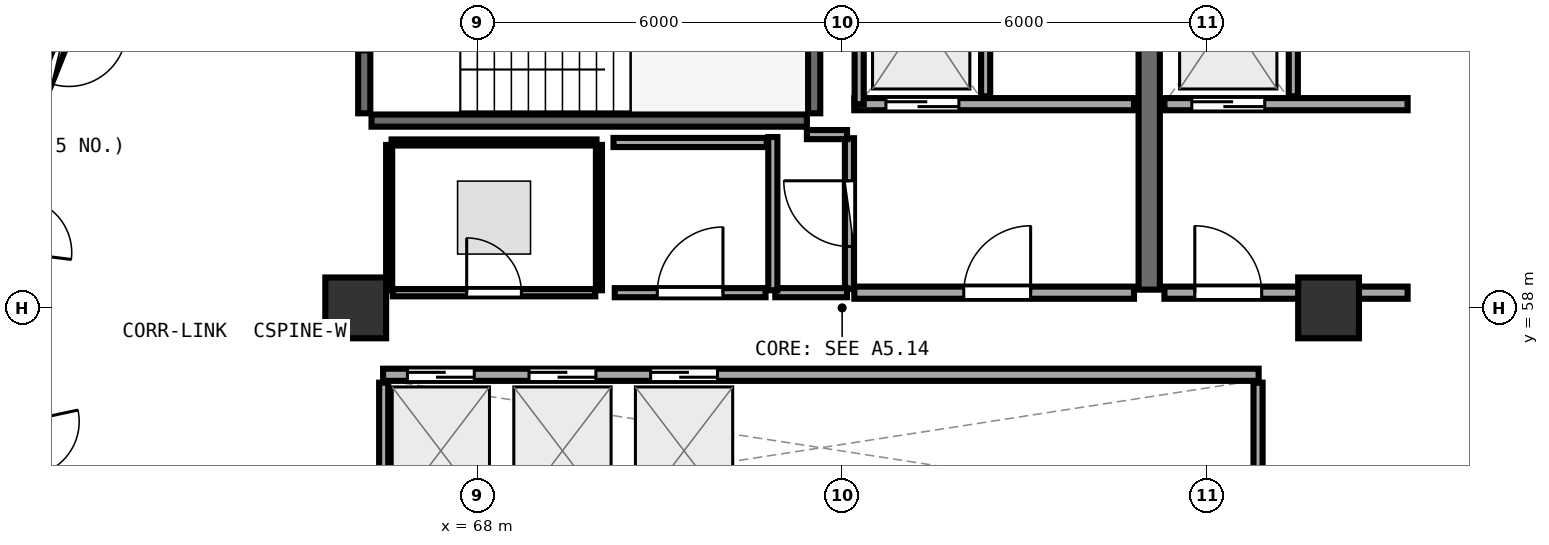
"""IFC4 building model, lengths in metres.
Left out: names, types, materials, properties, quantities, classifications, styles, units other than length and angle.
Written with IfcOpenShell. Run it as: python <this file> out.ifc"""

import sys

from ifc_helpers import new_model, si_unit, direction, frame, frame_2d, origin, origin_2d, place, context, subcontext, project, spatial, rectangle, extrude, element, fill, save


model = new_model("IFC4")
c1 = context("Model", 3, precision=1e-05, world=origin(), true_north=direction((0.0, 1.0)))
c2 = subcontext(c1, "Body", "Model", "MODEL_VIEW")
j1 = project(units=[si_unit("LENGTHUNIT", "METRE"), si_unit("PLANEANGLEUNIT", "RADIAN")], contexts=[c1])
p1 = place(None, origin())
s1 = spatial("IfcSite", under=j1, at=p1, CompositionType="ELEMENT")
p2 = place(p1, origin())
s2 = spatial("IfcBuilding", under=s1, at=p2, CompositionType="ELEMENT")
p3 = place(p2, frame((0.0, 0.0, 226.95)))
s3 = spatial("IfcBuildingStorey", under=s2, at=p3, CompositionType="ELEMENT", Elevation=226.95)
for number, where, z_axis, x_axis in (
    (1, (82.0, 58.0, 0.0), (0.0, 0.0, 1.0), (1.0, 0.0, 0.0)),
    (2, (66.0, 58.0, 0.0), (0.0, 0.0, 1.0), (1.0, 0.0, 0.0)),
):
    element("IfcColumn", number, at=place(p3, frame(where, z_axis=z_axis, x_axis=x_axis)), inside=s3, PredefinedType="PILASTER", context=c2, shape_type="SweptSolid", body=[
        extrude(rectangle(XDim=1.0, YDim=1.0, at=origin_2d()), origin(), (0.0, 0.0, 1.0), 3.75),
    ])
p4 = place(p3, frame((66.26, 61.08, 0.0), z_axis=(0.0, 0.0, 1.0), x_axis=(1.0, 0.0, 0.0)))
e3 = element("IfcWall", 3, at=p4, inside=s3, PredefinedType="SHEAR", context=c2, shape_type="SweptSolid", body=[
    extrude(rectangle(XDim=7.16, YDim=0.2, at=frame_2d((3.58, 0.0))), origin(), (0.0, 0.0, 1.0), 3.49),
])
p5 = place(p3, frame((73.54, 61.2, 0.0), z_axis=(0.0, 0.0, 1.0), x_axis=(0.0, 1.0, 0.0)))
e4 = element("IfcWall", 4, at=p5, inside=s3, PredefinedType="SHEAR", context=c2, shape_type="SweptSolid", body=[
    extrude(rectangle(XDim=3.07, YDim=0.2, at=frame_2d((1.535, 0.0))), origin(), (0.0, 0.0, 1.0), 3.49),
])
p6 = place(p3, frame((66.14, 64.27, 0.0), z_axis=(0.0, 0.0, 1.0), x_axis=(0.0, -1.0, 0.0)))
e5 = element("IfcWall", 5, at=p6, inside=s3, PredefinedType="SHEAR", context=c2, shape_type="SweptSolid", body=[
    extrude(rectangle(XDim=3.07, YDim=0.2, at=frame_2d((1.535, 0.0))), origin(), (0.0, 0.0, 1.0), 3.49),
])
p7 = place(p6, frame((1.01, 0.0, 0.0)))
e6 = element("IfcOpeningElement", 6, at=p7, cuts=e5, PredefinedType="OPENING", context=c2, shape_type="SweptSolid", body=[
    extrude(rectangle(XDim=1.05, YDim=2.1, at=frame_2d((0.525, 1.05))), frame((0.0, 0.11, 0.0), z_axis=(0.0, -1.0, 0.0), x_axis=(1.0, 0.0, 0.0)), (0.0, 0.0, 1.0), 0.22),
])
p8 = place(p3, frame((79.05, 58.3, 0.0), z_axis=(0.0, 0.0, 1.0), x_axis=(0.0, 1.0, 0.0)))
e7 = element("IfcWall", 7, at=p8, inside=s3, PredefinedType="SHEAR", context=c2, shape_type="SweptSolid", body=[
    extrude(rectangle(XDim=6.3, YDim=0.35, at=frame_2d((3.15, 0.0))), origin(), (0.0, 0.0, 1.0), 3.49),
])
p9 = place(p3, frame((74.2, 61.35, 0.0), z_axis=(0.0, 0.0, 1.0), x_axis=(1.0, 0.0, 0.0)))
e8 = element("IfcWall", 8, at=p9, inside=s3, PredefinedType="SOLIDWALL", context=c2, shape_type="SweptSolid", body=[
    extrude(rectangle(XDim=4.6, YDim=0.2, at=frame_2d((2.3, 0.0))), origin(), (0.0, 0.0, 1.0), 3.48),
])
p10 = place(p9, frame((0.52, 0.0, 0.0)))
e9 = element("IfcOpeningElement", 9, at=p10, cuts=e8, PredefinedType="OPENING", context=c2, shape_type="SweptSolid", body=[
    extrude(rectangle(XDim=1.2, YDim=2.15, at=frame_2d((0.6, 1.075))), frame((0.0, 0.11, 0.0), z_axis=(0.0, -1.0, 0.0), x_axis=(1.0, 0.0, 0.0)), (0.0, 0.0, 1.0), 0.22),
])
p11 = place(p3, frame((74.28, 61.35, 0.0), z_axis=(0.0, 0.0, 1.0), x_axis=(0.0, 1.0, 0.0)))
e10 = element("IfcWall", 10, at=p11, inside=s3, PredefinedType="PARTITIONING", context=c2, shape_type="SweptSolid", body=[
    extrude(rectangle(XDim=2.97, YDim=0.15, at=frame_2d((1.485, 0.0))), origin(), (0.0, 0.0, 1.0), 3.48),
])
p12 = place(p3, frame((76.36, 61.48, 0.0), z_axis=(0.0, 0.0, 1.0), x_axis=(0.0, 1.0, 0.0)))
e11 = element("IfcWall", 11, at=p12, inside=s3, PredefinedType="PARTITIONING", context=c2, shape_type="SweptSolid", body=[
    extrude(rectangle(XDim=2.84, YDim=0.15, at=frame_2d((1.42, 0.0))), origin(), (0.0, 0.0, 1.0), 3.48),
])
p13 = place(p3, frame((79.3, 61.35, 0.0), z_axis=(0.0, 0.0, 1.0), x_axis=(1.0, 0.0, 0.0)))
e12 = element("IfcWall", 12, at=p13, inside=s3, PredefinedType="SOLIDWALL", context=c2, shape_type="SweptSolid", body=[
    extrude(rectangle(XDim=4.0, YDim=0.2, at=frame_2d((2.0, 0.0))), origin(), (0.0, 0.0, 1.0), 2.775),
])
p14 = place(p13, frame((0.45, 0.0, 0.0)))
e13 = element("IfcOpeningElement", 13, at=p14, cuts=e12, PredefinedType="OPENING", context=c2, shape_type="SweptSolid", body=[
    extrude(rectangle(XDim=1.2, YDim=2.15, at=frame_2d((0.6, 1.075))), frame((0.0, 0.11, 0.0), z_axis=(0.0, -1.0, 0.0), x_axis=(1.0, 0.0, 0.0)), (0.0, 0.0, 1.0), 0.22),
])
p15 = place(p3, frame((81.42, 61.48, 0.0), z_axis=(0.0, 0.0, 1.0), x_axis=(0.0, 1.0, 0.0)))
e14 = element("IfcWall", 14, at=p15, inside=s3, PredefinedType="PARTITIONING", context=c2, shape_type="SweptSolid", body=[
    extrude(rectangle(XDim=2.84, YDim=0.15, at=frame_2d((1.42, 0.0))), origin(), (0.0, 0.0, 1.0), 3.48),
])
p16 = place(p3, frame((74.2, 58.25, 0.0), z_axis=(0.0, 0.0, 1.0), x_axis=(1.0, 0.0, 0.0)))
e15 = element("IfcWall", 15, at=p16, inside=s3, PredefinedType="SOLIDWALL", context=c2, shape_type="SweptSolid", body=[
    extrude(rectangle(XDim=4.6, YDim=0.2, at=frame_2d((2.3, 0.0))), origin(), (0.0, 0.0, 1.0), 3.48),
])
p17 = place(p16, frame((1.8, 0.0, 0.0)))
e16 = element("IfcOpeningElement", 16, at=p17, cuts=e15, PredefinedType="OPENING", context=c2, shape_type="SweptSolid", body=[
    extrude(rectangle(XDim=1.1, YDim=2.1, at=frame_2d((0.55, 1.05))), frame((0.0, 0.11, 0.0), z_axis=(0.0, -1.0, 0.0), x_axis=(1.0, 0.0, 0.0)), (0.0, 0.0, 1.0), 0.22),
])
p18 = place(p3, frame((79.3, 58.25, 0.0), z_axis=(0.0, 0.0, 1.0), x_axis=(1.0, 0.0, 0.0)))
e17 = element("IfcWall", 17, at=p18, inside=s3, PredefinedType="SOLIDWALL", context=c2, shape_type="SweptSolid", body=[
    extrude(rectangle(XDim=4.0, YDim=0.2, at=frame_2d((2.0, 0.0))), origin(), (0.0, 0.0, 1.0), 2.775),
])
p19 = place(p18, frame((0.5, 0.0, 0.0)))
e18 = element("IfcOpeningElement", 18, at=p19, cuts=e17, PredefinedType="OPENING", context=c2, shape_type="SweptSolid", body=[
    extrude(rectangle(XDim=1.1, YDim=2.1, at=frame_2d((0.55, 1.05))), frame((0.0, 0.11, 0.0), z_axis=(0.0, -1.0, 0.0), x_axis=(1.0, 0.0, 0.0)), (0.0, 0.0, 1.0), 0.22),
])
p20 = place(p3, frame((66.45, 56.9, 0.0), z_axis=(0.0, 0.0, 1.0), x_axis=(1.0, 0.0, 0.0)))
e19 = element("IfcWall", 19, at=p20, inside=s3, PredefinedType="SOLIDWALL", context=c2, shape_type="SweptSolid", body=[
    extrude(rectangle(XDim=14.4, YDim=0.2, at=frame_2d((7.2, 0.0))), origin(), (0.0, 0.0, 1.0), 3.48),
])
p21 = place(p20, frame((0.4, 0.0, 0.0)))
e20 = element("IfcOpeningElement", 20, at=p21, cuts=e19, PredefinedType="OPENING", context=c2, shape_type="SweptSolid", body=[
    extrude(rectangle(XDim=1.1, YDim=2.1, at=frame_2d((0.55, 1.05))), frame((0.0, 0.11, 0.0), z_axis=(0.0, -1.0, 0.0), x_axis=(1.0, 0.0, 0.0)), (0.0, 0.0, 1.0), 0.22),
])
p22 = place(p20, frame((2.4, 0.0, 0.0)))
e21 = element("IfcOpeningElement", 21, at=p22, cuts=e19, PredefinedType="OPENING", context=c2, shape_type="SweptSolid", body=[
    extrude(rectangle(XDim=1.1, YDim=2.1, at=frame_2d((0.55, 1.05))), frame((0.0, 0.11, 0.0), z_axis=(0.0, -1.0, 0.0), x_axis=(1.0, 0.0, 0.0)), (0.0, 0.0, 1.0), 0.22),
])
p23 = place(p20, frame((4.4, 0.0, 0.0)))
e22 = element("IfcOpeningElement", 22, at=p23, cuts=e19, PredefinedType="OPENING", context=c2, shape_type="SweptSolid", body=[
    extrude(rectangle(XDim=1.1, YDim=2.1, at=frame_2d((0.55, 1.05))), frame((0.0, 0.11, 0.0), z_axis=(0.0, -1.0, 0.0), x_axis=(1.0, 0.0, 0.0)), (0.0, 0.0, 1.0), 0.22),
])
for number, where, z_axis, x_axis in (
    (23, (66.46, 54.48, 0.0), (0.0, 0.0, 1.0), (0.0, 1.0, 0.0)),
    (24, (80.84, 54.48, 0.0), (0.0, 0.0, 1.0), (0.0, 1.0, 0.0)),
):
    element("IfcWall", number, at=place(p3, frame(where, z_axis=z_axis, x_axis=x_axis)), inside=s3, PredefinedType="PARTITIONING", context=c2, shape_type="SweptSolid", body=[
        extrude(rectangle(XDim=2.29, YDim=0.15, at=frame_2d((1.145, 0.0))), origin(), (0.0, 0.0, 1.0), 3.48),
    ])
p24 = place(p3, frame((74.12, 58.31, 0.0), z_axis=(0.0, 0.0, 1.0), x_axis=(0.0, 1.0, 0.0)))
e25 = element("IfcWall", 25, at=p24, inside=s3, PredefinedType="PARTITIONING", context=c2, shape_type="SweptSolid", body=[
    extrude(rectangle(XDim=2.48, YDim=0.15, at=frame_2d((1.24, 0.0))), origin(), (0.0, 0.0, 1.0), 3.48),
])
p25 = place(p24, frame((0.7, 0.0, 0.0)))
e26 = element("IfcOpeningElement", 26, at=p25, cuts=e25, PredefinedType="OPENING", context=c2, shape_type="SweptSolid", body=[
    extrude(rectangle(XDim=1.08, YDim=2.1, at=frame_2d((0.54, 1.05))), frame((0.0, 0.085, 0.0), z_axis=(0.0, -1.0, 0.0), x_axis=(1.0, 0.0, 0.0)), (0.0, 0.0, 1.0), 0.17),
])
p26 = place(p3, frame((66.61, 58.25, 0.0), z_axis=(0.0, 0.0, 1.0), x_axis=(1.0, 0.0, 0.0)))
e27 = element("IfcWall", 27, at=p26, inside=s3, PredefinedType="PARTITIONING", context=c2, shape_type="SweptSolid", body=[
    extrude(rectangle(XDim=3.33, YDim=0.12, at=frame_2d((1.665, 0.0))), origin(), (0.0, 0.0, 1.0), 3.48),
])
p27 = place(p26, frame((1.215, 0.0, 0.0)))
e28 = element("IfcOpeningElement", 28, at=p27, cuts=e27, PredefinedType="OPENING", context=c2, shape_type="SweptSolid", body=[
    extrude(rectangle(XDim=0.9, YDim=2.08, at=frame_2d((0.45, 1.04))), frame((0.0, 0.07, 0.0), z_axis=(0.0, -1.0, 0.0), x_axis=(1.0, 0.0, 0.0)), (0.0, 0.0, 1.0), 0.14),
])
p28 = place(p3, frame((70.26, 58.25, 0.0), z_axis=(0.0, 0.0, 1.0), x_axis=(1.0, 0.0, 0.0)))
e29 = element("IfcWall", 29, at=p28, inside=s3, PredefinedType="PARTITIONING", context=c2, shape_type="SweptSolid", body=[
    extrude(rectangle(XDim=2.48, YDim=0.15, at=frame_2d((1.24, 0.0))), origin(), (0.0, 0.0, 1.0), 3.48),
])
p29 = place(p28, frame((0.7, 0.0, 0.0)))
e30 = element("IfcOpeningElement", 30, at=p29, cuts=e29, PredefinedType="OPENING", context=c2, shape_type="SweptSolid", body=[
    extrude(rectangle(XDim=1.08, YDim=2.1, at=frame_2d((0.54, 1.05))), frame((0.0, 0.085, 0.0), z_axis=(0.0, -1.0, 0.0), x_axis=(1.0, 0.0, 0.0)), (0.0, 0.0, 1.0), 0.17),
])
p30 = place(p3, frame((61.409, 62.907, 0.0), z_axis=(0.0, 0.0, 1.0), x_axis=(-0.370667853418, -0.928765493783, 0.0)))
e31 = element("IfcWall", 31, at=p30, inside=s3, PredefinedType="PARTITIONING", context=c2, shape_type="SweptSolid", body=[
    extrude(rectangle(XDim=1.631, YDim=0.15, at=frame_2d((0.815, 0.0))), origin(), (0.0, 0.0, 1.0), 3.235),
])
p31 = place(p30, frame((0.34, 0.0, 0.0)))
e32 = element("IfcOpeningElement", 32, at=p31, cuts=e31, PredefinedType="OPENING", context=c2, shape_type="SweptSolid", body=[
    extrude(rectangle(XDim=0.95, YDim=2.08, at=frame_2d((0.475, 1.04))), frame((0.0, 0.085, 0.0), z_axis=(0.0, -1.0, 0.0), x_axis=(1.0, 0.0, 0.0)), (0.0, 0.0, 1.0), 0.17),
])
p32 = place(p3, frame((60.301, 57.303, 0.0), z_axis=(0.0, 0.0, 1.0), x_axis=(0.209791966594, -0.977746046145, 0.0)))
e33 = element("IfcWall", 33, at=p32, inside=s3, PredefinedType="PARTITIONING", context=c2, shape_type="SweptSolid", body=[
    extrude(rectangle(XDim=3.298, YDim=0.12, at=frame_2d((1.649, 0.0))), origin(), (0.0, 0.0, 1.0), 3.48),
])
p33 = place(p32, frame((1.199, 0.0, 0.0)))
e34 = element("IfcOpeningElement", 34, at=p33, cuts=e33, PredefinedType="OPENING", context=c2, shape_type="SweptSolid", body=[
    extrude(rectangle(XDim=0.9, YDim=2.08, at=frame_2d((0.45, 1.04))), frame((0.0, 0.07, 0.0), z_axis=(0.0, -1.0, 0.0), x_axis=(1.0, 0.0, 0.0)), (0.0, 0.0, 1.0), 0.14),
])
p34 = place(p3, frame((72.9, 58.25, 0.0), z_axis=(0.0, 0.0, 1.0), x_axis=(1.0, 0.0, 0.0)))
e35 = element("IfcWall", 35, at=p34, inside=s3, PredefinedType="PARTITIONING", context=c2, shape_type="SweptSolid", body=[
    extrude(rectangle(XDim=1.18, YDim=0.15, at=frame_2d((0.59, 0.0))), origin(), (0.0, 0.0, 1.0), 3.48),
])
p35 = place(p3, frame((74.08, 60.85, 0.0), z_axis=(0.0, 0.0, 1.0), x_axis=(-1.0, 0.0, 0.0)))
e36 = element("IfcWall", 36, at=p35, inside=s3, PredefinedType="PARTITIONING", context=c2, shape_type="SweptSolid", body=[
    extrude(rectangle(XDim=0.66, YDim=0.15, at=frame_2d((0.33, 0.0))), origin(), (0.0, 0.0, 1.0), 3.48),
])
p36 = place(p3, frame((72.86, 60.81, 0.0), z_axis=(0.0, 0.0, 1.0), x_axis=(0.0, -1.0, 0.0)))
e37 = element("IfcWall", 37, at=p36, inside=s3, PredefinedType="PARTITIONING", context=c2, shape_type="SweptSolid", body=[
    extrude(rectangle(XDim=2.52, YDim=0.15, at=frame_2d((1.26, 0.0))), origin(), (0.0, 0.0, 1.0), 3.48),
])
p37 = place(p3, frame((70.0, 58.29, 0.0), z_axis=(0.0, 0.0, 1.0), x_axis=(0.0, 1.0, 0.0)))
e38 = element("IfcWall", 38, at=p37, inside=s3, PredefinedType="PARTITIONING", context=c2, shape_type="SweptSolid", body=[
    extrude(rectangle(XDim=2.39, YDim=0.1, at=frame_2d((1.195, 0.0))), origin(), (0.0, 0.0, 1.0), 3.48),
])
p38 = place(p3, frame((69.96, 60.72, 0.0), z_axis=(0.0, 0.0, 1.0), x_axis=(-1.0, 0.0, 0.0)))
e39 = element("IfcWall", 39, at=p38, inside=s3, PredefinedType="PARTITIONING", context=c2, shape_type="SweptSolid", body=[
    extrude(rectangle(XDim=3.37, YDim=0.1, at=frame_2d((1.685, 0.0))), origin(), (0.0, 0.0, 1.0), 3.48),
])
p39 = place(p3, frame((66.55, 60.68, 0.0), z_axis=(0.0, 0.0, 1.0), x_axis=(0.0, -1.0, 0.0)))
e40 = element("IfcWall", 40, at=p39, inside=s3, PredefinedType="PARTITIONING", context=c2, shape_type="SweptSolid", body=[
    extrude(rectangle(XDim=2.39, YDim=0.1, at=frame_2d((1.195, 0.0))), origin(), (0.0, 0.0, 1.0), 3.48),
])
p40 = place(p3, frame((72.76, 60.72, 0.0), z_axis=(0.0, 0.0, 1.0), x_axis=(-1.0, 0.0, 0.0)))
e41 = element("IfcWall", 41, at=p40, inside=s3, PredefinedType="PARTITIONING", context=c2, shape_type="SweptSolid", body=[
    extrude(rectangle(XDim=2.52, YDim=0.15, at=frame_2d((1.26, 0.0))), origin(), (0.0, 0.0, 1.0), 3.48),
])
p41 = place(p10, origin())
e42 = element("IfcDoor", 42, at=p41, inside=s3, OperationType="DOUBLE_DOOR_SLIDING", PredefinedType="DOOR", context=c2, shape_type="SweptSolid", body=[
    extrude(rectangle(XDim=1.2, YDim=2.15, at=frame_2d((0.6, 1.075))), frame((0.0, 0.025, 0.0), z_axis=(0.0, -1.0, 0.0), x_axis=(1.0, 0.0, 0.0)), (0.0, 0.0, 1.0), 0.05),
])
fill(e9, e42)
p42 = place(p14, origin())
e43 = element("IfcDoor", 43, at=p42, inside=s3, OperationType="DOUBLE_DOOR_SLIDING", PredefinedType="DOOR", context=c2, shape_type="SweptSolid", body=[
    extrude(rectangle(XDim=1.2, YDim=2.15, at=frame_2d((0.6, 1.075))), frame((0.0, 0.025, 0.0), z_axis=(0.0, -1.0, 0.0), x_axis=(1.0, 0.0, 0.0)), (0.0, 0.0, 1.0), 0.05),
])
fill(e13, e43)
p43 = place(p17, frame((1.1, 0.0, 0.0), z_axis=(0.0, 0.0, 1.0), x_axis=(-1.0, 0.0, 0.0)))
e44 = element("IfcDoor", 44, at=p43, inside=s3, OperationType="SINGLE_SWING_LEFT", PredefinedType="DOOR", context=c2, shape_type="SweptSolid", body=[
    extrude(rectangle(XDim=1.1, YDim=2.1, at=frame_2d((0.55, 1.05))), frame((0.0, 0.025, 0.0), z_axis=(0.0, -1.0, 0.0), x_axis=(1.0, 0.0, 0.0)), (0.0, 0.0, 1.0), 0.05),
])
fill(e16, e44)
p44 = place(p19, frame((1.1, 0.0, 0.0), z_axis=(0.0, 0.0, 1.0), x_axis=(-1.0, 0.0, 0.0)))
e45 = element("IfcDoor", 45, at=p44, inside=s3, OperationType="SINGLE_SWING_RIGHT", PredefinedType="DOOR", context=c2, shape_type="SweptSolid", body=[
    extrude(rectangle(XDim=1.1, YDim=2.1, at=frame_2d((0.55, 1.05))), frame((0.0, 0.025, 0.0), z_axis=(0.0, -1.0, 0.0), x_axis=(1.0, 0.0, 0.0)), (0.0, 0.0, 1.0), 0.05),
])
fill(e18, e45)
p45 = place(p21, origin())
e46 = element("IfcDoor", 46, at=p45, inside=s3, OperationType="DOUBLE_DOOR_SLIDING", PredefinedType="DOOR", context=c2, shape_type="SweptSolid", body=[
    extrude(rectangle(XDim=1.1, YDim=2.1, at=frame_2d((0.55, 1.05))), frame((0.0, 0.025, 0.0), z_axis=(0.0, -1.0, 0.0), x_axis=(1.0, 0.0, 0.0)), (0.0, 0.0, 1.0), 0.05),
])
fill(e20, e46)
p46 = place(p22, origin())
e47 = element("IfcDoor", 47, at=p46, inside=s3, OperationType="DOUBLE_DOOR_SLIDING", PredefinedType="DOOR", context=c2, shape_type="SweptSolid", body=[
    extrude(rectangle(XDim=1.1, YDim=2.1, at=frame_2d((0.55, 1.05))), frame((0.0, 0.025, 0.0), z_axis=(0.0, -1.0, 0.0), x_axis=(1.0, 0.0, 0.0)), (0.0, 0.0, 1.0), 0.05),
])
fill(e21, e47)
p47 = place(p23, origin())
e48 = element("IfcDoor", 48, at=p47, inside=s3, OperationType="DOUBLE_DOOR_SLIDING", PredefinedType="DOOR", context=c2, shape_type="SweptSolid", body=[
    extrude(rectangle(XDim=1.1, YDim=2.1, at=frame_2d((0.55, 1.05))), frame((0.0, 0.025, 0.0), z_axis=(0.0, -1.0, 0.0), x_axis=(1.0, 0.0, 0.0)), (0.0, 0.0, 1.0), 0.05),
])
fill(e22, e48)
p48 = place(p25, origin())
e49 = element("IfcDoor", 49, at=p48, inside=s3, OperationType="SINGLE_SWING_RIGHT", PredefinedType="DOOR", context=c2, shape_type="SweptSolid", body=[
    extrude(rectangle(XDim=1.08, YDim=2.1, at=frame_2d((0.54, 1.05))), frame((0.0, 0.025, 0.0), z_axis=(0.0, -1.0, 0.0), x_axis=(1.0, 0.0, 0.0)), (0.0, 0.0, 1.0), 0.05),
])
fill(e26, e49)
p49 = place(p27, origin())
e50 = element("IfcDoor", 50, at=p49, inside=s3, OperationType="SINGLE_SWING_LEFT", PredefinedType="DOOR", context=c2, shape_type="SweptSolid", body=[
    extrude(rectangle(XDim=0.9, YDim=2.08, at=frame_2d((0.45, 1.04))), frame((0.0, 0.025, 0.0), z_axis=(0.0, -1.0, 0.0), x_axis=(1.0, 0.0, 0.0)), (0.0, 0.0, 1.0), 0.05),
])
fill(e28, e50)
p50 = place(p29, origin())
e51 = element("IfcDoor", 51, at=p50, inside=s3, OperationType="SINGLE_SWING_RIGHT", PredefinedType="DOOR", context=c2, shape_type="SweptSolid", body=[
    extrude(rectangle(XDim=1.08, YDim=2.1, at=frame_2d((0.54, 1.05))), frame((0.0, 0.025, 0.0), z_axis=(0.0, -1.0, 0.0), x_axis=(1.0, 0.0, 0.0)), (0.0, 0.0, 1.0), 0.05),
])
fill(e30, e51)
p51 = place(p31, origin())
e52 = element("IfcDoor", 52, at=p51, inside=s3, OperationType="SINGLE_SWING_LEFT", PredefinedType="DOOR", context=c2, shape_type="SweptSolid", body=[
    extrude(rectangle(XDim=0.95, YDim=2.08, at=frame_2d((0.475, 1.04))), frame((0.0, 0.025, 0.0), z_axis=(0.0, -1.0, 0.0), x_axis=(1.0, 0.0, 0.0)), (0.0, 0.0, 1.0), 0.05),
])
fill(e32, e52)
save(model, sys.argv[1])
